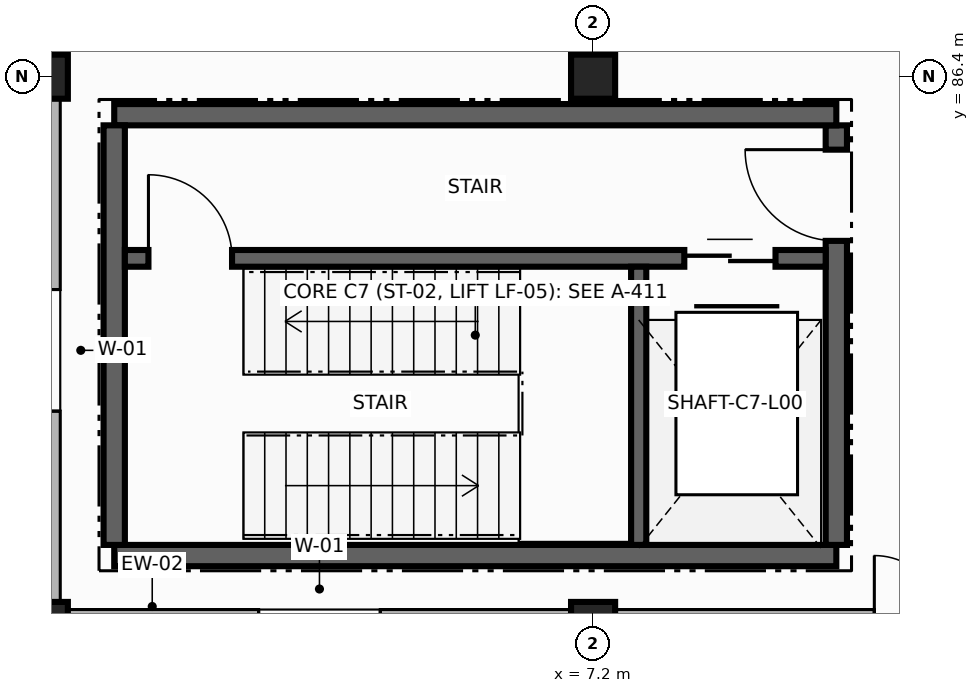
"""IFC4 building model, lengths in metres.
Left out: names, types, materials, properties, quantities, classifications, styles, units other than length and angle.
Written with IfcOpenShell. Run it as: python <this file> out.ifc"""

import sys

from ifc_helpers import new_model, si_unit, direction, frame, frame_2d, origin, origin_2d, place, context, subcontext, project, spatial, rectangle, extrude, element, fill, save


model = new_model("IFC4")
c1 = context("Model", 3, precision=1e-05, world=origin(), true_north=direction((0.0, 1.0)))
c2 = subcontext(c1, "Body", "Model", "MODEL_VIEW")
j1 = project(units=[si_unit("LENGTHUNIT", "METRE"), si_unit("PLANEANGLEUNIT", "RADIAN")], contexts=[c1])
p1 = place(None, origin())
s1 = spatial("IfcSite", under=j1, at=p1, CompositionType="ELEMENT")
p2 = place(p1, origin())
s2 = spatial("IfcBuilding", under=s1, at=p2, CompositionType="ELEMENT")
p3 = place(p2, origin())
s3 = spatial("IfcBuildingStorey", under=s2, at=p3, CompositionType="ELEMENT", Elevation=0.0)
for number, where, z_axis, x_axis in (
    (1, (0.0, 79.2, -0.38), (0.0, 0.0, 1.0), (1.0, 0.0, 0.0)),
    (2, (0.0, 86.4, -0.38), (0.0, 0.0, 1.0), (1.0, 0.0, 0.0)),
    (3, (7.2, 79.2, -0.38), (0.0, 0.0, 1.0), (1.0, 0.0, 0.0)),
    (4, (7.2, 86.4, -0.38), (0.0, 0.0, 1.0), (1.0, 0.0, 0.0)),
):
    element("IfcColumn", number, at=place(p3, frame(where, z_axis=z_axis, x_axis=x_axis)), inside=s3, PredefinedType="COLUMN", context=c2, shape_type="SweptSolid", body=[
        extrude(rectangle(XDim=0.58, YDim=0.58, at=origin_2d()), origin(), (0.0, 0.0, 1.0), 4.57),
    ])
p4 = place(p3, frame((0.0, 79.2, 0.0), z_axis=(0.0, 0.0, 1.0), x_axis=(1.0, 0.0, 0.0)))
e5 = element("IfcWall", 5, at=p4, inside=s3, PredefinedType="SOLIDWALL", context=c2, shape_type="SweptSolid", body=[
    extrude(rectangle(XDim=7.2, YDim=0.38, at=frame_2d((3.6, 0.0))), origin(), (0.0, 0.0, 1.0), 3.52),
])
p5 = place(p4, frame((2.8, 0.0, 0.85)))
e6 = element("IfcOpeningElement", 6, at=p5, cuts=e5, PredefinedType="OPENING", context=c2, shape_type="SweptSolid", body=[
    extrude(rectangle(XDim=1.6, YDim=2.45, at=frame_2d((0.8, 1.225))), frame((0.0, 0.2, 0.0), z_axis=(0.0, -1.0, 0.0), x_axis=(1.0, 0.0, 0.0)), (0.0, 0.0, 1.0), 0.4),
])
p6 = place(p3, frame((7.2, 79.2, 0.0), z_axis=(0.0, 0.0, 1.0), x_axis=(1.0, 0.0, 0.0)))
e7 = element("IfcWall", 7, at=p6, inside=s3, PredefinedType="SOLIDWALL", context=c2, shape_type="SweptSolid", body=[
    extrude(rectangle(XDim=7.2, YDim=0.38, at=frame_2d((3.6, 0.0))), origin(), (0.0, 0.0, 1.0), 3.52),
])
p7 = place(p6, frame((3.7, 0.0, 0.0)))
e8 = element("IfcOpeningElement", 8, at=p7, cuts=e7, PredefinedType="OPENING", context=c2, shape_type="SweptSolid", body=[
    extrude(rectangle(XDim=1.8, YDim=2.4, at=frame_2d((0.9, 1.2))), frame((0.0, 0.2, 0.0), z_axis=(0.0, -1.0, 0.0), x_axis=(1.0, 0.0, 0.0)), (0.0, 0.0, 1.0), 0.4),
])
p8 = place(p3, frame((0.0, 93.6, 0.0), z_axis=(0.0, 0.0, 1.0), x_axis=(0.0, -1.0, 0.0)))
e9 = element("IfcWall", 9, at=p8, inside=s3, PredefinedType="SOLIDWALL", context=c2, shape_type="SweptSolid", body=[
    extrude(rectangle(XDim=7.2, YDim=0.38, at=frame_2d((3.6, 0.0))), origin(), (0.0, 0.0, 1.0), 3.52),
])
p9 = place(p8, frame((2.8, 0.0, 0.0)))
e10 = element("IfcOpeningElement", 10, at=p9, cuts=e9, PredefinedType="OPENING", context=c2, shape_type="SweptSolid", body=[
    extrude(rectangle(XDim=2.2, YDim=2.6, at=frame_2d((1.1, 1.3))), frame((0.0, 0.2, 0.0), z_axis=(0.0, -1.0, 0.0), x_axis=(1.0, 0.0, 0.0)), (0.0, 0.0, 1.0), 0.4),
])
p10 = place(p3, frame((0.0, 86.4, 0.0), z_axis=(0.0, 0.0, 1.0), x_axis=(0.0, -1.0, 0.0)))
e11 = element("IfcWall", 11, at=p10, inside=s3, PredefinedType="SOLIDWALL", context=c2, shape_type="SweptSolid", body=[
    extrude(rectangle(XDim=7.2, YDim=0.38, at=frame_2d((3.6, 0.0))), origin(), (0.0, 0.0, 1.0), 3.52),
])
p11 = place(p10, frame((2.8, 0.0, 0.85)))
e12 = element("IfcOpeningElement", 12, at=p11, cuts=e11, PredefinedType="OPENING", context=c2, shape_type="SweptSolid", body=[
    extrude(rectangle(XDim=1.6, YDim=2.45, at=frame_2d((0.8, 1.225))), frame((0.0, 0.2, 0.0), z_axis=(0.0, -1.0, 0.0), x_axis=(1.0, 0.0, 0.0)), (0.0, 0.0, 1.0), 0.4),
])
p12 = place(p3, frame((0.9, 80.1, 0.0), z_axis=(0.0, 0.0, 1.0), x_axis=(1.0, 0.0, 0.0)))
e13 = element("IfcWall", 13, at=p12, inside=s3, PredefinedType="SHEAR", context=c2, shape_type="SweptSolid", body=[
    extrude(rectangle(XDim=9.5, YDim=0.28, at=frame_2d((4.75, 0.0))), origin(), (0.0, 0.0, 1.0), 4.19),
])
p13 = place(p3, frame((10.4, 80.24, 0.0), z_axis=(0.0, 0.0, 1.0), x_axis=(0.0, 1.0, 0.0)))
e14 = element("IfcWall", 14, at=p13, inside=s3, PredefinedType="SHEAR", context=c2, shape_type="SweptSolid", body=[
    extrude(rectangle(XDim=5.52, YDim=0.28, at=frame_2d((2.76, 0.0))), origin(), (0.0, 0.0, 1.0), 4.19),
])
p14 = place(p13, frame((4.0, 0.0, 0.0)))
e15 = element("IfcOpeningElement", 15, at=p14, cuts=e14, PredefinedType="OPENING", context=c2, shape_type="SweptSolid", body=[
    extrude(rectangle(XDim=1.2, YDim=2.25, at=frame_2d((0.6, 1.125))), frame((0.0, 0.15, 0.0), z_axis=(0.0, -1.0, 0.0), x_axis=(1.0, 0.0, 0.0)), (0.0, 0.0, 1.0), 0.3),
])
p15 = place(p3, frame((10.4, 85.9, 0.0), z_axis=(0.0, 0.0, 1.0), x_axis=(-1.0, 0.0, 0.0)))
e16 = element("IfcWall", 16, at=p15, inside=s3, PredefinedType="SHEAR", context=c2, shape_type="SweptSolid", body=[
    extrude(rectangle(XDim=9.5, YDim=0.28, at=frame_2d((4.75, 0.0))), origin(), (0.0, 0.0, 1.0), 4.19),
])
p16 = place(p3, frame((0.9, 85.76, 0.0), z_axis=(0.0, 0.0, 1.0), x_axis=(0.0, -1.0, 0.0)))
e17 = element("IfcWall", 17, at=p16, inside=s3, PredefinedType="SHEAR", context=c2, shape_type="SweptSolid", body=[
    extrude(rectangle(XDim=5.52, YDim=0.28, at=frame_2d((2.76, 0.0))), origin(), (0.0, 0.0, 1.0), 4.19),
])
p17 = place(p3, frame((1.04, 84.01, 0.0), z_axis=(0.0, 0.0, 1.0), x_axis=(1.0, 0.0, 0.0)))
e18 = element("IfcWall", 18, at=p17, inside=s3, PredefinedType="SHEAR", context=c2, shape_type="SweptSolid", body=[
    extrude(rectangle(XDim=9.22, YDim=0.22, at=frame_2d((4.61, 0.0))), origin(), (0.0, 0.0, 1.0), 4.19),
])
p18 = place(p17, frame((0.31, 0.0, 0.0)))
e19 = element("IfcOpeningElement", 19, at=p18, cuts=e18, PredefinedType="OPENING", context=c2, shape_type="SweptSolid", body=[
    extrude(rectangle(XDim=1.1, YDim=2.15, at=frame_2d((0.55, 1.075))), frame((0.0, 0.12, 0.0), z_axis=(0.0, -1.0, 0.0), x_axis=(1.0, 0.0, 0.0)), (0.0, 0.0, 1.0), 0.24),
])
p19 = place(p17, frame((7.36, 0.0, 0.0)))
e20 = element("IfcOpeningElement", 20, at=p19, cuts=e18, PredefinedType="OPENING", context=c2, shape_type="SweptSolid", body=[
    extrude(rectangle(XDim=1.2, YDim=2.2, at=frame_2d((0.6, 1.1))), frame((0.0, 0.12, 0.0), z_axis=(0.0, -1.0, 0.0), x_axis=(1.0, 0.0, 0.0)), (0.0, 0.0, 1.0), 0.24),
])
p20 = place(p3, frame((7.8, 80.24, 0.0), z_axis=(0.0, 0.0, 1.0), x_axis=(0.0, 1.0, 0.0)))
e21 = element("IfcWall", 21, at=p20, inside=s3, PredefinedType="SHEAR", context=c2, shape_type="SweptSolid", body=[
    extrude(rectangle(XDim=3.66, YDim=0.2, at=frame_2d((1.83, 0.0))), origin(), (0.0, 0.0, 1.0), 4.19),
])
p21 = place(p18, origin())
e22 = element("IfcDoor", 22, at=p21, inside=s3, OperationType="SINGLE_SWING_LEFT", PredefinedType="DOOR", context=c2, shape_type="SweptSolid", body=[
    extrude(rectangle(XDim=1.1, YDim=2.15, at=frame_2d((0.55, 1.075))), frame((0.0, 0.025, 0.0), z_axis=(0.0, -1.0, 0.0), x_axis=(1.0, 0.0, 0.0)), (0.0, 0.0, 1.0), 0.05),
])
fill(e19, e22)
p22 = place(p19, origin())
e23 = element("IfcDoor", 23, at=p22, inside=s3, OperationType="DOUBLE_DOOR_SLIDING", PredefinedType="DOOR", context=c2, shape_type="SweptSolid", body=[
    extrude(rectangle(XDim=1.2, YDim=2.2, at=frame_2d((0.6, 1.1))), frame((0.0, 0.025, 0.0), z_axis=(0.0, -1.0, 0.0), x_axis=(1.0, 0.0, 0.0)), (0.0, 0.0, 1.0), 0.05),
])
fill(e20, e23)
p23 = place(p14, origin())
e24 = element("IfcDoor", 24, at=p23, inside=s3, OperationType="SINGLE_SWING_RIGHT", PredefinedType="DOOR", context=c2, shape_type="SweptSolid", body=[
    extrude(rectangle(XDim=1.2, YDim=2.25, at=frame_2d((0.6, 1.125))), frame((0.0, 0.025, 0.0), z_axis=(0.0, -1.0, 0.0), x_axis=(1.0, 0.0, 0.0)), (0.0, 0.0, 1.0), 0.05),
])
fill(e15, e24)
save(model, sys.argv[1])
